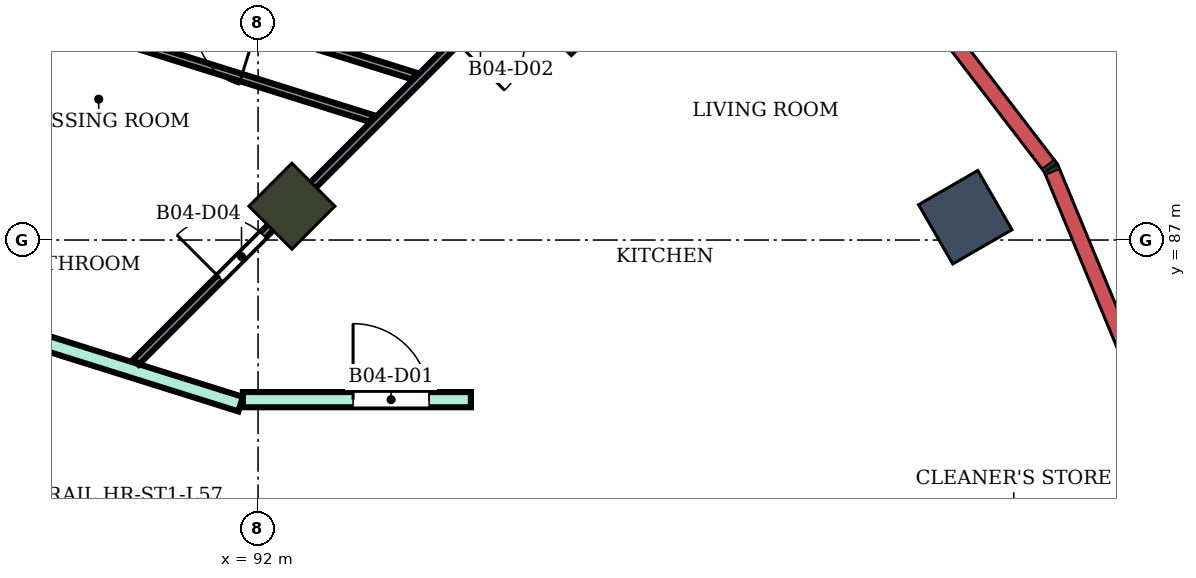
"""IFC4 building model, lengths in metres.
Left out: names, types, materials, properties, quantities, classifications, styles, units other than length and angle.
Written with IfcOpenShell. Run it as: python <this file> out.ifc"""

import sys

from ifc_helpers import new_model, si_unit, direction, frame, frame_2d, origin, origin_2d, place, context, subcontext, project, spatial, rectangle, extrude, element, fill, save


model = new_model("IFC4")
c1 = context("Model", 3, precision=1e-05, world=origin(), true_north=direction((0.0, 1.0)))
c2 = subcontext(c1, "Body", "Model", "MODEL_VIEW")
j1 = project(units=[si_unit("LENGTHUNIT", "METRE"), si_unit("PLANEANGLEUNIT", "RADIAN")], contexts=[c1])
p1 = place(None, origin())
s1 = spatial("IfcSite", under=j1, at=p1, CompositionType="ELEMENT")
p2 = place(p1, origin())
s2 = spatial("IfcBuilding", under=s1, at=p2, CompositionType="ELEMENT")
p3 = place(p2, frame((0.0, 0.0, 249.9)))
s3 = spatial("IfcBuildingStorey", under=s2, at=p3, CompositionType="ELEMENT", Elevation=249.9)
p4 = place(p3, frame((101.304, 87.3, 0.0), z_axis=(0.0, 0.0, 1.0), x_axis=(0.866025403784, 0.5, 0.0)))
e1 = element("IfcColumn", 1, at=p4, inside=s3, PredefinedType="COLUMN", context=c2, shape_type="SweptSolid", body=[
    extrude(rectangle(XDim=0.9, YDim=0.9, at=origin_2d()), origin(), (0.0, 0.0, 1.0), 4.2),
])
p5 = place(p3, frame((92.445, 87.445, 0.0), z_axis=(0.0, 0.0, 1.0), x_axis=(0.707106781187, 0.707106781187, 0.0)))
e2 = element("IfcColumn", 2, at=p5, inside=s3, PredefinedType="COLUMN", context=c2, shape_type="SweptSolid", body=[
    extrude(rectangle(XDim=0.8, YDim=0.8, at=origin_2d()), origin(), (0.0, 0.0, 1.0), 4.2),
])
p6 = place(p3, frame((95.91, 90.91, 0.0), z_axis=(0.0, 0.0, 1.0), x_axis=(0.707106781187, 0.707106781187, 0.0)))
e3 = element("IfcColumn", 3, at=p6, inside=s3, PredefinedType="COLUMN", context=c2, shape_type="SweptSolid", body=[
    extrude(rectangle(XDim=1.8, YDim=2.4, at=origin_2d()), origin(), (0.0, 0.0, 1.0), 4.2),
])
p7 = place(p3, frame((86.313, 86.554, 0.0), z_axis=(0.0, 0.0, 1.0), x_axis=(0.954077387881, -0.29956024091, 0.0)))
e4 = element("IfcWall", 4, at=p7, inside=s3, PredefinedType="PARTITIONING", context=c2, shape_type="SweptSolid", body=[
    extrude(rectangle(XDim=5.72, YDim=0.2, at=frame_2d((2.86, 0.0))), origin(), (0.0, 0.0, 1.0), 3.75),
])
p8 = place(p3, frame((86.677, 86.562, 0.0), z_axis=(0.0, 0.0, 1.0), x_axis=(0.500139020429, 0.865945125424, 0.0)))
e5 = element("IfcWall", 5, at=p8, inside=s3, PredefinedType="PARTITIONING", context=c2, shape_type="SweptSolid", body=[
    extrude(rectangle(XDim=12.446, YDim=0.2, at=frame_2d((6.223, 0.0))), origin(), (0.0, 0.0, 1.0), 3.75),
])
p9 = place(p3, frame((91.8, 84.9, 0.0), z_axis=(0.0, 0.0, 1.0), x_axis=(1.0, 0.0, 0.0)))
e6 = element("IfcWall", 6, at=p9, inside=s3, PredefinedType="PARTITIONING", context=c2, shape_type="SweptSolid", body=[
    extrude(rectangle(XDim=3.0, YDim=0.2, at=frame_2d((1.5, 0.0))), origin(), (0.0, 0.0, 1.0), 3.75),
])
p10 = place(p9, frame((1.45, 0.0, 0.0)))
e7 = element("IfcOpeningElement", 7, at=p10, cuts=e6, PredefinedType="OPENING", context=c2, shape_type="SweptSolid", body=[
    extrude(rectangle(XDim=1.0, YDim=2.1, at=frame_2d((0.5, 1.05))), frame((0.0, 0.11, 0.0), z_axis=(0.0, -1.0, 0.0), x_axis=(1.0, 0.0, 0.0)), (0.0, 0.0, 1.0), 0.22),
])
p11 = place(p3, frame((88.858, 90.053, 0.0), z_axis=(0.0, 0.0, 1.0), x_axis=(0.954180222183, -0.299232524294, 0.0)))
e8 = element("IfcWall", 8, at=p11, inside=s3, PredefinedType="PARTITIONING", context=c2, shape_type="SweptSolid", body=[
    extrude(rectangle(XDim=4.863, YDim=0.1, at=frame_2d((2.431, 0.0))), origin(), (0.0, 0.0, 1.0), 3.75),
])
p12 = place(p3, frame((89.18, 90.685, 0.0), z_axis=(0.0, 0.0, 1.0), x_axis=(0.954251036713, -0.299006620215, 0.0)))
e9 = element("IfcWall", 9, at=p12, inside=s3, PredefinedType="PARTITIONING", context=c2, shape_type="SweptSolid", body=[
    extrude(rectangle(XDim=5.111, YDim=0.1, at=frame_2d((2.555, 0.0))), origin(), (0.0, 0.0, 1.0), 3.75),
])
p13 = place(p12, frame((2.14, 0.0, 0.0)))
e10 = element("IfcOpeningElement", 10, at=p13, cuts=e9, PredefinedType="OPENING", context=c2, shape_type="SweptSolid", body=[
    extrude(rectangle(XDim=0.8, YDim=2.1, at=frame_2d((0.4, 1.05))), frame((0.0, 0.06, 0.0), z_axis=(0.0, -1.0, 0.0), x_axis=(1.0, 0.0, 0.0)), (0.0, 0.0, 1.0), 0.12),
])
p14 = place(p3, frame((90.395, 85.395, 0.0), z_axis=(0.0, 0.0, 1.0), x_axis=(0.707279106146, 0.706934414221, 0.0)))
e11 = element("IfcWall", 11, at=p14, inside=s3, PredefinedType="PARTITIONING", context=c2, shape_type="SweptSolid", body=[
    extrude(rectangle(XDim=8.5, YDim=0.1, at=frame_2d((4.25, 0.0))), origin(), (0.0, 0.0, 1.0), 3.75),
])
p15 = place(p14, frame((5.957, 0.0, 0.0)))
e12 = element("IfcOpeningElement", 12, at=p15, cuts=e11, PredefinedType="OPENING", context=c2, shape_type="SweptSolid", body=[
    extrude(rectangle(XDim=0.9, YDim=2.1, at=frame_2d((0.45, 1.05))), frame((0.0, 0.06, 0.0), z_axis=(0.0, -1.0, 0.0), x_axis=(1.0, 0.0, 0.0)), (0.0, 0.0, 1.0), 0.12),
])
p16 = place(p14, frame((1.562, 0.0, 0.0)))
e13 = element("IfcOpeningElement", 13, at=p16, cuts=e11, PredefinedType="OPENING", context=c2, shape_type="SweptSolid", body=[
    extrude(rectangle(XDim=0.8, YDim=2.1, at=frame_2d((0.4, 1.05))), frame((0.0, 0.06, 0.0), z_axis=(0.0, -1.0, 0.0), x_axis=(1.0, 0.0, 0.0)), (0.0, 0.0, 1.0), 0.12),
])
p17 = place(p10, origin())
e14 = element("IfcDoor", 14, at=p17, inside=s3, OperationType="SINGLE_SWING_LEFT", PredefinedType="DOOR", context=c2, shape_type="SweptSolid", body=[
    extrude(rectangle(XDim=1.0, YDim=2.1, at=frame_2d((0.5, 1.05))), frame((0.0, 0.025, 0.0), z_axis=(0.0, -1.0, 0.0), x_axis=(1.0, 0.0, 0.0)), (0.0, 0.0, 1.0), 0.05),
])
fill(e7, e14)
p18 = place(p16, origin())
e15 = element("IfcDoor", 15, at=p18, inside=s3, OperationType="SINGLE_SWING_LEFT", PredefinedType="DOOR", context=c2, shape_type="SweptSolid", body=[
    extrude(rectangle(XDim=0.8, YDim=2.1, at=frame_2d((0.4, 1.05))), frame((0.0, 0.025, 0.0), z_axis=(0.0, -1.0, 0.0), x_axis=(1.0, 0.0, 0.0)), (0.0, 0.0, 1.0), 0.05),
])
fill(e13, e15)
save(model, sys.argv[1])
